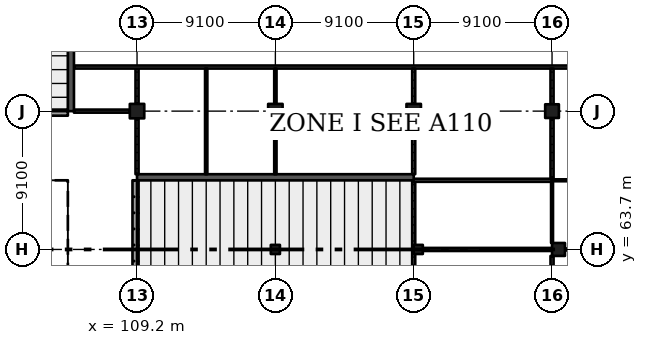
"""IFC4 building model, lengths in metres.
Left out: names, types, materials, properties, quantities, classifications, styles, units other than length and angle.
Written with IfcOpenShell. Run it as: python <this file> out.ifc"""

import sys

from ifc_helpers import new_model, si_unit, direction, frame, frame_2d, origin, origin_2d, place, context, subcontext, project, spatial, rectangle, extrude, element, fill, save


model = new_model("IFC4")
c1 = context("Model", 3, precision=1e-05, world=origin(), true_north=direction((0.0, 1.0)))
c2 = subcontext(c1, "Body", "Model", "MODEL_VIEW")
j1 = project(units=[si_unit("LENGTHUNIT", "METRE"), si_unit("PLANEANGLEUNIT", "RADIAN")], contexts=[c1])
p1 = place(None, origin())
s1 = spatial("IfcSite", under=j1, at=p1, CompositionType="ELEMENT")
p2 = place(p1, origin())
s2 = spatial("IfcBuilding", under=s1, at=p2, CompositionType="ELEMENT")
p3 = place(p2, origin())
s3 = spatial("IfcBuildingStorey", under=s2, at=p3, CompositionType="ELEMENT", Elevation=0.0)
p4 = place(p3, frame((109.2, 72.8, -0.4), z_axis=(0.0, 0.0, 1.0), x_axis=(1.0, 0.0, 0.0)))
e1 = element("IfcColumn", 1, at=p4, inside=s3, PredefinedType="COLUMN", context=c2, shape_type="SweptSolid", body=[
    extrude(rectangle(XDim=0.95, YDim=0.95, at=origin_2d()), origin(), (0.0, 0.0, 1.0), 6.77),
])
p5 = place(p3, frame((118.3, 63.7, -0.4), z_axis=(0.0, 0.0, 1.0), x_axis=(1.0, 0.0, 0.0)))
e2 = element("IfcColumn", 2, at=p5, inside=s3, PredefinedType="COLUMN", context=c2, shape_type="SweptSolid", body=[
    extrude(rectangle(XDim=0.6, YDim=0.6, at=origin_2d()), origin(), (0.0, 0.0, 1.0), 2.133),
])
p6 = place(p3, frame((118.3, 72.8, -0.4), z_axis=(0.0, 0.0, 1.0), x_axis=(1.0, 0.0, 0.0)))
e3 = element("IfcColumn", 3, at=p6, inside=s3, PredefinedType="COLUMN", context=c2, shape_type="SweptSolid", body=[
    extrude(rectangle(XDim=0.95, YDim=0.95, at=origin_2d()), origin(), (0.0, 0.0, 1.0), 6.77),
])
p7 = place(p3, frame((127.7, 63.7, -0.4), z_axis=(0.0, 0.0, 1.0), x_axis=(1.0, 0.0, 0.0)))
e4 = element("IfcColumn", 4, at=p7, inside=s3, PredefinedType="COLUMN", context=c2, shape_type="SweptSolid", body=[
    extrude(rectangle(XDim=0.6, YDim=0.6, at=origin_2d()), origin(), (0.0, 0.0, 1.0), 6.77),
])
p8 = place(p3, frame((127.4, 72.8, -0.4), z_axis=(0.0, 0.0, 1.0), x_axis=(1.0, 0.0, 0.0)))
e5 = element("IfcColumn", 5, at=p8, inside=s3, PredefinedType="COLUMN", context=c2, shape_type="SweptSolid", body=[
    extrude(rectangle(XDim=0.95, YDim=0.95, at=origin_2d()), origin(), (0.0, 0.0, 1.0), 6.77),
])
p9 = place(p3, frame((136.925, 63.7, -0.4), z_axis=(0.0, 0.0, 1.0), x_axis=(1.0, 0.0, 0.0)))
e6 = element("IfcColumn", 6, at=p9, inside=s3, PredefinedType="COLUMN", context=c2, shape_type="SweptSolid", body=[
    extrude(rectangle(XDim=0.85, YDim=0.85, at=origin_2d()), origin(), (0.0, 0.0, 1.0), 6.77),
])
p10 = place(p3, frame((136.5, 72.8, -0.4), z_axis=(0.0, 0.0, 1.0), x_axis=(1.0, 0.0, 0.0)))
e7 = element("IfcColumn", 7, at=p10, inside=s3, PredefinedType="COLUMN", context=c2, shape_type="SweptSolid", body=[
    extrude(rectangle(XDim=0.9, YDim=0.9, at=origin_2d()), origin(), (0.0, 0.0, 1.0), 6.77),
])
p11 = place(p3, frame((40.95, 72.65, -0.4), z_axis=(0.0, 0.0, 1.0), x_axis=(1.0, 0.0, 0.0)))
e8 = element("IfcWall", 8, at=p11, inside=s3, PredefinedType="SOLIDWALL", context=c2, shape_type="SweptSolid", body=[
    extrude(rectangle(XDim=63.7, YDim=0.3, at=frame_2d((31.85, 0.0))), origin(), (0.0, 0.0, 1.0), 1.45),
])
p12 = place(p3, frame((109.05, 40.95, -0.4), z_axis=(0.0, 0.0, 1.0), x_axis=(0.0, 1.0, 0.0)))
e9 = element("IfcWall", 9, at=p12, inside=s3, PredefinedType="SOLIDWALL", context=c2, shape_type="SweptSolid", body=[
    extrude(rectangle(XDim=27.3, YDim=0.3, at=frame_2d((13.65, 0.0))), origin(), (0.0, 0.0, 1.0), 1.45),
])
for number, where, z_axis, x_axis in (
    (10, (104.85, 72.8, -0.4), (0.0, 0.0, 1.0), (0.0, 1.0, 0.0)),
    (11, (109.2, 68.45, -0.4), (0.0, 0.0, 1.0), (1.0, 0.0, 0.0)),
):
    element("IfcWall", number, at=place(p3, frame(where, z_axis=z_axis, x_axis=x_axis)), inside=s3, PredefinedType="SHEAR", context=c2, shape_type="SweptSolid", body=[
        extrude(rectangle(XDim=18.2, YDim=0.4, at=frame_2d((9.1, 0.0))), origin(), (0.0, 0.0, 1.0), 6.77),
    ])
p13 = place(p3, frame((108.725, 72.8, 0.0), z_axis=(0.0, 0.0, 1.0), x_axis=(-1.0, 0.0, 0.0)))
e12 = element("IfcWall", 12, at=p13, inside=s3, PredefinedType="PARTITIONING", context=c2, shape_type="SweptSolid", body=[
    extrude(rectangle(XDim=3.675, YDim=0.2, at=frame_2d((1.837, 0.0))), origin(), (0.0, 0.0, 1.0), 6.02),
])
p14 = place(p13, frame((0.65, 0.0, 0.0)))
e13 = element("IfcOpeningElement", 13, at=p14, cuts=e12, PredefinedType="OPENING", context=c2, shape_type="SweptSolid", body=[
    extrude(rectangle(XDim=2.4, YDim=2.4, at=frame_2d((1.2, 1.2))), frame((0.0, 0.11, 0.0), z_axis=(0.0, -1.0, 0.0), x_axis=(1.0, 0.0, 0.0)), (0.0, 0.0, 1.0), 0.22),
])
p15 = place(p3, frame((109.2, 68.65, 0.0), z_axis=(0.0, 0.0, 1.0), x_axis=(0.0, 1.0, 0.0)))
e14 = element("IfcWall", 14, at=p15, inside=s3, PredefinedType="PARTITIONING", context=c2, shape_type="SweptSolid", body=[
    extrude(rectangle(XDim=3.675, YDim=0.2, at=frame_2d((1.837, 0.0))), origin(), (0.0, 0.0, 1.0), 6.02),
])
p16 = place(p3, frame((109.2, 73.275, 0.0), z_axis=(0.0, 0.0, 1.0), x_axis=(0.0, 1.0, 0.0)))
e15 = element("IfcWall", 15, at=p16, inside=s3, PredefinedType="PARTITIONING", context=c2, shape_type="SweptSolid", body=[
    extrude(rectangle(XDim=2.325, YDim=0.2, at=frame_2d((1.163, 0.0))), origin(), (0.0, 0.0, 1.0), 5.32),
])
p17 = place(p3, frame((105.05, 75.7, 0.0), z_axis=(0.0, 0.0, 1.0), x_axis=(1.0, 0.0, 0.0)))
e16 = element("IfcWall", 16, at=p17, inside=s3, PredefinedType="PARTITIONING", context=c2, shape_type="SweptSolid", body=[
    extrude(rectangle(XDim=40.35, YDim=0.2, at=frame_2d((20.175, 0.0))), origin(), (0.0, 0.0, 1.0), 6.02),
])
p18 = place(p17, frame((35.3, 0.0, 0.0)))
e17 = element("IfcOpeningElement", 17, at=p18, cuts=e16, PredefinedType="OPENING", context=c2, shape_type="SweptSolid", body=[
    extrude(rectangle(XDim=1.1, YDim=2.1, at=frame_2d((0.55, 1.05))), frame((0.0, 0.11, 0.0), z_axis=(0.0, -1.0, 0.0), x_axis=(1.0, 0.0, 0.0)), (0.0, 0.0, 1.0), 0.22),
])
p19 = place(p17, frame((17.3, 0.0, 0.0)))
e18 = element("IfcOpeningElement", 18, at=p19, cuts=e16, PredefinedType="OPENING", context=c2, shape_type="SweptSolid", body=[
    extrude(rectangle(XDim=1.1, YDim=2.1, at=frame_2d((0.55, 1.05))), frame((0.0, 0.11, 0.0), z_axis=(0.0, -1.0, 0.0), x_axis=(1.0, 0.0, 0.0)), (0.0, 0.0, 1.0), 0.22),
])
p20 = place(p17, frame((10.45, 0.0, 0.0)))
e19 = element("IfcOpeningElement", 19, at=p20, cuts=e16, PredefinedType="OPENING", context=c2, shape_type="SweptSolid", body=[
    extrude(rectangle(XDim=1.0, YDim=2.1, at=frame_2d((0.5, 1.05))), frame((0.0, 0.11, 0.0), z_axis=(0.0, -1.0, 0.0), x_axis=(1.0, 0.0, 0.0)), (0.0, 0.0, 1.0), 0.22),
])
p21 = place(p17, frame((5.9, 0.0, 0.0)))
e20 = element("IfcOpeningElement", 20, at=p21, cuts=e16, PredefinedType="OPENING", context=c2, shape_type="SweptSolid", body=[
    extrude(rectangle(XDim=1.0, YDim=2.1, at=frame_2d((0.5, 1.05))), frame((0.0, 0.11, 0.0), z_axis=(0.0, -1.0, 0.0), x_axis=(1.0, 0.0, 0.0)), (0.0, 0.0, 1.0), 0.22),
])
p22 = place(p17, frame((28.0, 0.0, 0.0)))
e21 = element("IfcOpeningElement", 21, at=p22, cuts=e16, PredefinedType="OPENING", context=c2, shape_type="SweptSolid", body=[
    extrude(rectangle(XDim=2.4, YDim=2.4, at=frame_2d((1.2, 1.2))), frame((0.0, 0.11, 0.0), z_axis=(0.0, -1.0, 0.0), x_axis=(1.0, 0.0, 0.0)), (0.0, 0.0, 1.0), 0.22),
])
p23 = place(p17, frame((23.4, 0.0, 0.0)))
e22 = element("IfcOpeningElement", 22, at=p23, cuts=e16, PredefinedType="OPENING", context=c2, shape_type="SweptSolid", body=[
    extrude(rectangle(XDim=2.4, YDim=2.4, at=frame_2d((1.2, 1.2))), frame((0.0, 0.11, 0.0), z_axis=(0.0, -1.0, 0.0), x_axis=(1.0, 0.0, 0.0)), (0.0, 0.0, 1.0), 0.22),
])
p24 = place(p17, frame((0.9, 0.0, 0.0)))
e23 = element("IfcOpeningElement", 23, at=p24, cuts=e16, PredefinedType="OPENING", context=c2, shape_type="SweptSolid", body=[
    extrude(rectangle(XDim=2.4, YDim=2.4, at=frame_2d((1.2, 1.2))), frame((0.0, 0.11, 0.0), z_axis=(0.0, -1.0, 0.0), x_axis=(1.0, 0.0, 0.0)), (0.0, 0.0, 1.0), 0.22),
])
p25 = place(p3, frame((113.75, 68.65, 0.0), z_axis=(0.0, 0.0, 1.0), x_axis=(0.0, 1.0, 0.0)))
e24 = element("IfcWall", 24, at=p25, inside=s3, PredefinedType="PARTITIONING", context=c2, shape_type="SweptSolid", body=[
    extrude(rectangle(XDim=6.95, YDim=0.15, at=frame_2d((3.475, 0.0))), origin(), (0.0, 0.0, 1.0), 6.02),
])
p26 = place(p3, frame((118.3, 68.65, 0.0), z_axis=(0.0, 0.0, 1.0), x_axis=(0.0, 1.0, 0.0)))
e25 = element("IfcWall", 25, at=p26, inside=s3, PredefinedType="PARTITIONING", context=c2, shape_type="SweptSolid", body=[
    extrude(rectangle(XDim=3.675, YDim=0.15, at=frame_2d((1.837, 0.0))), origin(), (0.0, 0.0, 1.0), 6.02),
])
p27 = place(p3, frame((118.3, 73.275, 0.0), z_axis=(0.0, 0.0, 1.0), x_axis=(0.0, 1.0, 0.0)))
e26 = element("IfcWall", 26, at=p27, inside=s3, PredefinedType="PARTITIONING", context=c2, shape_type="SweptSolid", body=[
    extrude(rectangle(XDim=2.325, YDim=0.15, at=frame_2d((1.163, 0.0))), origin(), (0.0, 0.0, 1.0), 5.32),
])
p28 = place(p3, frame((127.4, 54.9, 0.0), z_axis=(0.0, 0.0, 1.0), x_axis=(0.0, 1.0, 0.0)))
e27 = element("IfcWall", 27, at=p28, inside=s3, PredefinedType="PARTITIONING", context=c2, shape_type="SweptSolid", body=[
    extrude(rectangle(XDim=8.8, YDim=0.2, at=frame_2d((4.4, 0.0))), origin(), (0.0, 0.0, 1.0), 5.02),
])
p29 = place(p3, frame((127.4, 63.7, 0.0), z_axis=(0.0, 0.0, 1.0), x_axis=(0.0, 1.0, 0.0)))
e28 = element("IfcWall", 28, at=p29, inside=s3, PredefinedType="PARTITIONING", context=c2, shape_type="SweptSolid", body=[
    extrude(rectangle(XDim=4.45, YDim=0.2, at=frame_2d((2.225, 0.0))), origin(), (0.0, 0.0, 1.0), 5.02),
])
p30 = place(p3, frame((127.4, 72.325, 0.0), z_axis=(0.0, 0.0, 1.0), x_axis=(0.0, -1.0, 0.0)))
e29 = element("IfcWall", 29, at=p30, inside=s3, PredefinedType="PARTITIONING", context=c2, shape_type="SweptSolid", body=[
    extrude(rectangle(XDim=3.675, YDim=0.2, at=frame_2d((1.837, 0.0))), origin(), (0.0, 0.0, 1.0), 5.02),
])
p31 = place(p3, frame((127.4, 75.6, 0.0), z_axis=(0.0, 0.0, 1.0), x_axis=(0.0, -1.0, 0.0)))
e30 = element("IfcWall", 30, at=p31, inside=s3, PredefinedType="PARTITIONING", context=c2, shape_type="SweptSolid", body=[
    extrude(rectangle(XDim=2.325, YDim=0.2, at=frame_2d((1.163, 0.0))), origin(), (0.0, 0.0, 1.0), 5.32),
])
p32 = place(p3, frame((136.5, 63.275, 0.0), z_axis=(0.0, 0.0, 1.0), x_axis=(0.0, -1.0, 0.0)))
e31 = element("IfcWall", 31, at=p32, inside=s3, PredefinedType="PARTITIONING", context=c2, shape_type="SweptSolid", body=[
    extrude(rectangle(XDim=8.25, YDim=0.2, at=frame_2d((4.125, 0.0))), origin(), (0.0, 0.0, 1.0), 5.32),
])
p33 = place(p32, frame((1.15, 0.0, 0.0)))
e32 = element("IfcOpeningElement", 32, at=p33, cuts=e31, PredefinedType="OPENING", context=c2, shape_type="SweptSolid", body=[
    extrude(rectangle(XDim=1.8, YDim=2.4, at=frame_2d((0.9, 1.2))), frame((0.0, 0.11, 0.0), z_axis=(0.0, -1.0, 0.0), x_axis=(1.0, 0.0, 0.0)), (0.0, 0.0, 1.0), 0.22),
])
p34 = place(p32, frame((5.25, 0.0, 0.0)))
e33 = element("IfcOpeningElement", 33, at=p34, cuts=e31, PredefinedType="OPENING", context=c2, shape_type="SweptSolid", body=[
    extrude(rectangle(XDim=1.8, YDim=2.4, at=frame_2d((0.9, 1.2))), frame((0.0, 0.11, 0.0), z_axis=(0.0, -1.0, 0.0), x_axis=(1.0, 0.0, 0.0)), (0.0, 0.0, 1.0), 0.22),
])
p35 = place(p3, frame((136.5, 63.7, 0.0), z_axis=(0.0, 0.0, 1.0), x_axis=(-1.0, 0.0, 0.0)))
e34 = element("IfcWall", 34, at=p35, inside=s3, PredefinedType="PARTITIONING", context=c2, shape_type="SweptSolid", body=[
    extrude(rectangle(XDim=8.5, YDim=0.2, at=frame_2d((4.25, 0.0))), origin(), (0.0, 0.0, 1.0), 5.27),
])
p36 = place(p35, frame((0.65, 0.0, 0.0)))
e35 = element("IfcOpeningElement", 35, at=p36, cuts=e34, PredefinedType="OPENING", context=c2, shape_type="SweptSolid", body=[
    extrude(rectangle(XDim=3.0, YDim=2.4, at=frame_2d((1.5, 1.2))), frame((0.0, 0.11, 0.0), z_axis=(0.0, -1.0, 0.0), x_axis=(1.0, 0.0, 0.0)), (0.0, 0.0, 1.0), 0.22),
])
p37 = place(p35, frame((4.85, 0.0, 0.0)))
e36 = element("IfcOpeningElement", 36, at=p37, cuts=e34, PredefinedType="OPENING", context=c2, shape_type="SweptSolid", body=[
    extrude(rectangle(XDim=3.0, YDim=2.4, at=frame_2d((1.5, 1.2))), frame((0.0, 0.11, 0.0), z_axis=(0.0, -1.0, 0.0), x_axis=(1.0, 0.0, 0.0)), (0.0, 0.0, 1.0), 0.22),
])
p38 = place(p3, frame((136.5, 68.15, 0.0), z_axis=(0.0, 0.0, 1.0), x_axis=(0.0, -1.0, 0.0)))
e37 = element("IfcWall", 37, at=p38, inside=s3, PredefinedType="PARTITIONING", context=c2, shape_type="SweptSolid", body=[
    extrude(rectangle(XDim=4.025, YDim=0.125, at=frame_2d((2.012, 0.0))), origin(), (0.0, 0.0, 1.0), 5.32),
])
p39 = place(p38, frame((1.55, 0.0, 0.0)))
e38 = element("IfcOpeningElement", 38, at=p39, cuts=e37, PredefinedType="OPENING", context=c2, shape_type="SweptSolid", body=[
    extrude(rectangle(XDim=0.9, YDim=2.1, at=frame_2d((0.45, 1.05))), frame((0.0, 0.073, 0.0), z_axis=(0.0, -1.0, 0.0), x_axis=(1.0, 0.0, 0.0)), (0.0, 0.0, 1.0), 0.145),
])
p40 = place(p3, frame((136.5, 68.25, 0.0), z_axis=(0.0, 0.0, 1.0), x_axis=(-1.0, 0.0, 0.0)))
e39 = element("IfcWall", 39, at=p40, inside=s3, PredefinedType="PARTITIONING", context=c2, shape_type="SweptSolid", body=[
    extrude(rectangle(XDim=9.2, YDim=0.2, at=frame_2d((4.6, 0.0))), origin(), (0.0, 0.0, 1.0), 6.02),
])
p41 = place(p40, frame((0.75, 0.0, 0.0)))
e40 = element("IfcOpeningElement", 40, at=p41, cuts=e39, PredefinedType="OPENING", context=c2, shape_type="SweptSolid", body=[
    extrude(rectangle(XDim=3.0, YDim=2.4, at=frame_2d((1.5, 1.2))), frame((0.0, 0.11, 0.0), z_axis=(0.0, -1.0, 0.0), x_axis=(1.0, 0.0, 0.0)), (0.0, 0.0, 1.0), 0.22),
])
p42 = place(p40, frame((5.35, 0.0, 0.0)))
e41 = element("IfcOpeningElement", 41, at=p42, cuts=e39, PredefinedType="OPENING", context=c2, shape_type="SweptSolid", body=[
    extrude(rectangle(XDim=3.0, YDim=2.4, at=frame_2d((1.5, 1.2))), frame((0.0, 0.11, 0.0), z_axis=(0.0, -1.0, 0.0), x_axis=(1.0, 0.0, 0.0)), (0.0, 0.0, 1.0), 0.22),
])
p43 = place(p3, frame((136.5, 68.35, 0.0), z_axis=(0.0, 0.0, 1.0), x_axis=(0.0, 1.0, 0.0)))
e42 = element("IfcWall", 42, at=p43, inside=s3, PredefinedType="PARTITIONING", context=c2, shape_type="SweptSolid", body=[
    extrude(rectangle(XDim=4.0, YDim=0.2, at=frame_2d((2.0, 0.0))), origin(), (0.0, 0.0, 1.0), 5.32),
])
p44 = place(p3, frame((136.5, 73.25, 0.0), z_axis=(0.0, 0.0, 1.0), x_axis=(0.0, 1.0, 0.0)))
e43 = element("IfcWall", 43, at=p44, inside=s3, PredefinedType="PARTITIONING", context=c2, shape_type="SweptSolid", body=[
    extrude(rectangle(XDim=2.35, YDim=0.2, at=frame_2d((1.175, 0.0))), origin(), (0.0, 0.0, 1.0), 5.32),
])
p45 = place(p3, frame((137.35, 63.7, 0.0), z_axis=(0.0, 0.0, 1.0), x_axis=(1.0, 0.0, 0.0)))
e44 = element("IfcWall", 44, at=p45, inside=s3, PredefinedType="PARTITIONING", context=c2, shape_type="SweptSolid", body=[
    extrude(rectangle(XDim=7.95, YDim=0.125, at=frame_2d((3.975, 0.0))), origin(), (0.0, 0.0, 1.0), 5.32),
])
p46 = place(p3, frame((145.45, 68.25, 0.0), z_axis=(0.0, 0.0, 1.0), x_axis=(-1.0, 0.0, 0.0)))
e45 = element("IfcWall", 45, at=p46, inside=s3, PredefinedType="PARTITIONING", context=c2, shape_type="SweptSolid", body=[
    extrude(rectangle(XDim=8.95, YDim=0.125, at=frame_2d((4.475, 0.0))), origin(), (0.0, 0.0, 1.0), 6.02),
])
p47 = place(p19, origin())
e46 = element("IfcDoor", 46, at=p47, inside=s3, OperationType="SINGLE_SWING_RIGHT", PredefinedType="DOOR", context=c2, shape_type="SweptSolid", body=[
    extrude(rectangle(XDim=1.1, YDim=2.1, at=frame_2d((0.55, 1.05))), frame((0.0, 0.025, 0.0), z_axis=(0.0, -1.0, 0.0), x_axis=(1.0, 0.0, 0.0)), (0.0, 0.0, 1.0), 0.05),
])
fill(e18, e46)
p48 = place(p20, origin())
e47 = element("IfcDoor", 47, at=p48, inside=s3, OperationType="SINGLE_SWING_LEFT", PredefinedType="DOOR", context=c2, shape_type="SweptSolid", body=[
    extrude(rectangle(XDim=1.0, YDim=2.1, at=frame_2d((0.5, 1.05))), frame((0.0, 0.025, 0.0), z_axis=(0.0, -1.0, 0.0), x_axis=(1.0, 0.0, 0.0)), (0.0, 0.0, 1.0), 0.05),
])
fill(e19, e47)
p49 = place(p21, origin())
e48 = element("IfcDoor", 48, at=p49, inside=s3, OperationType="SINGLE_SWING_LEFT", PredefinedType="DOOR", context=c2, shape_type="SweptSolid", body=[
    extrude(rectangle(XDim=1.0, YDim=2.1, at=frame_2d((0.5, 1.05))), frame((0.0, 0.025, 0.0), z_axis=(0.0, -1.0, 0.0), x_axis=(1.0, 0.0, 0.0)), (0.0, 0.0, 1.0), 0.05),
])
fill(e20, e48)
p50 = place(p39, origin())
e49 = element("IfcDoor", 49, at=p50, inside=s3, OperationType="SINGLE_SWING_RIGHT", PredefinedType="DOOR", context=c2, shape_type="SweptSolid", body=[
    extrude(rectangle(XDim=0.9, YDim=2.1, at=frame_2d((0.45, 1.05))), frame((0.0, 0.025, 0.0), z_axis=(0.0, -1.0, 0.0), x_axis=(1.0, 0.0, 0.0)), (0.0, 0.0, 1.0), 0.05),
])
fill(e38, e49)
p51 = place(p22, origin())
e50 = element("IfcDoor", 50, at=p51, inside=s3, OperationType="DOUBLE_DOOR_SINGLE_SWING", PredefinedType="DOOR", context=c2, shape_type="SweptSolid", body=[
    extrude(rectangle(XDim=2.4, YDim=2.4, at=frame_2d((1.2, 1.2))), frame((0.0, 0.025, 0.0), z_axis=(0.0, -1.0, 0.0), x_axis=(1.0, 0.0, 0.0)), (0.0, 0.0, 1.0), 0.05),
])
fill(e21, e50)
p52 = place(p23, origin())
e51 = element("IfcDoor", 51, at=p52, inside=s3, OperationType="DOUBLE_DOOR_SINGLE_SWING", PredefinedType="DOOR", context=c2, shape_type="SweptSolid", body=[
    extrude(rectangle(XDim=2.4, YDim=2.4, at=frame_2d((1.2, 1.2))), frame((0.0, 0.025, 0.0), z_axis=(0.0, -1.0, 0.0), x_axis=(1.0, 0.0, 0.0)), (0.0, 0.0, 1.0), 0.05),
])
fill(e22, e51)
p53 = place(p24, origin())
e52 = element("IfcDoor", 52, at=p53, inside=s3, OperationType="DOUBLE_DOOR_SINGLE_SWING", PredefinedType="DOOR", context=c2, shape_type="SweptSolid", body=[
    extrude(rectangle(XDim=2.4, YDim=2.4, at=frame_2d((1.2, 1.2))), frame((0.0, 0.025, 0.0), z_axis=(0.0, -1.0, 0.0), x_axis=(1.0, 0.0, 0.0)), (0.0, 0.0, 1.0), 0.05),
])
fill(e23, e52)
p54 = place(p14, origin())
e53 = element("IfcDoor", 53, at=p54, inside=s3, OperationType="DOUBLE_DOOR_SINGLE_SWING", PredefinedType="DOOR", context=c2, shape_type="SweptSolid", body=[
    extrude(rectangle(XDim=2.4, YDim=2.4, at=frame_2d((1.2, 1.2))), frame((0.0, 0.025, 0.0), z_axis=(0.0, -1.0, 0.0), x_axis=(1.0, 0.0, 0.0)), (0.0, 0.0, 1.0), 0.05),
])
fill(e13, e53)
p55 = place(p41, origin())
e54 = element("IfcDoor", 54, at=p55, inside=s3, OperationType="DOUBLE_DOOR_SINGLE_SWING", PredefinedType="DOOR", context=c2, shape_type="SweptSolid", body=[
    extrude(rectangle(XDim=3.0, YDim=2.4, at=frame_2d((1.5, 1.2))), frame((0.0, 0.025, 0.0), z_axis=(0.0, -1.0, 0.0), x_axis=(1.0, 0.0, 0.0)), (0.0, 0.0, 1.0), 0.05),
])
fill(e40, e54)
p56 = place(p42, origin())
e55 = element("IfcDoor", 55, at=p56, inside=s3, OperationType="DOUBLE_DOOR_SINGLE_SWING", PredefinedType="DOOR", context=c2, shape_type="SweptSolid", body=[
    extrude(rectangle(XDim=3.0, YDim=2.4, at=frame_2d((1.5, 1.2))), frame((0.0, 0.025, 0.0), z_axis=(0.0, -1.0, 0.0), x_axis=(1.0, 0.0, 0.0)), (0.0, 0.0, 1.0), 0.05),
])
fill(e41, e55)
p57 = place(p36, origin())
e56 = element("IfcDoor", 56, at=p57, inside=s3, OperationType="DOUBLE_DOOR_SINGLE_SWING", PredefinedType="DOOR", context=c2, shape_type="SweptSolid", body=[
    extrude(rectangle(XDim=3.0, YDim=2.4, at=frame_2d((1.5, 1.2))), frame((0.0, 0.025, 0.0), z_axis=(0.0, -1.0, 0.0), x_axis=(1.0, 0.0, 0.0)), (0.0, 0.0, 1.0), 0.05),
])
fill(e35, e56)
p58 = place(p37, origin())
e57 = element("IfcDoor", 57, at=p58, inside=s3, OperationType="DOUBLE_DOOR_SINGLE_SWING", PredefinedType="DOOR", context=c2, shape_type="SweptSolid", body=[
    extrude(rectangle(XDim=3.0, YDim=2.4, at=frame_2d((1.5, 1.2))), frame((0.0, 0.025, 0.0), z_axis=(0.0, -1.0, 0.0), x_axis=(1.0, 0.0, 0.0)), (0.0, 0.0, 1.0), 0.05),
])
fill(e36, e57)
save(model, sys.argv[1])
